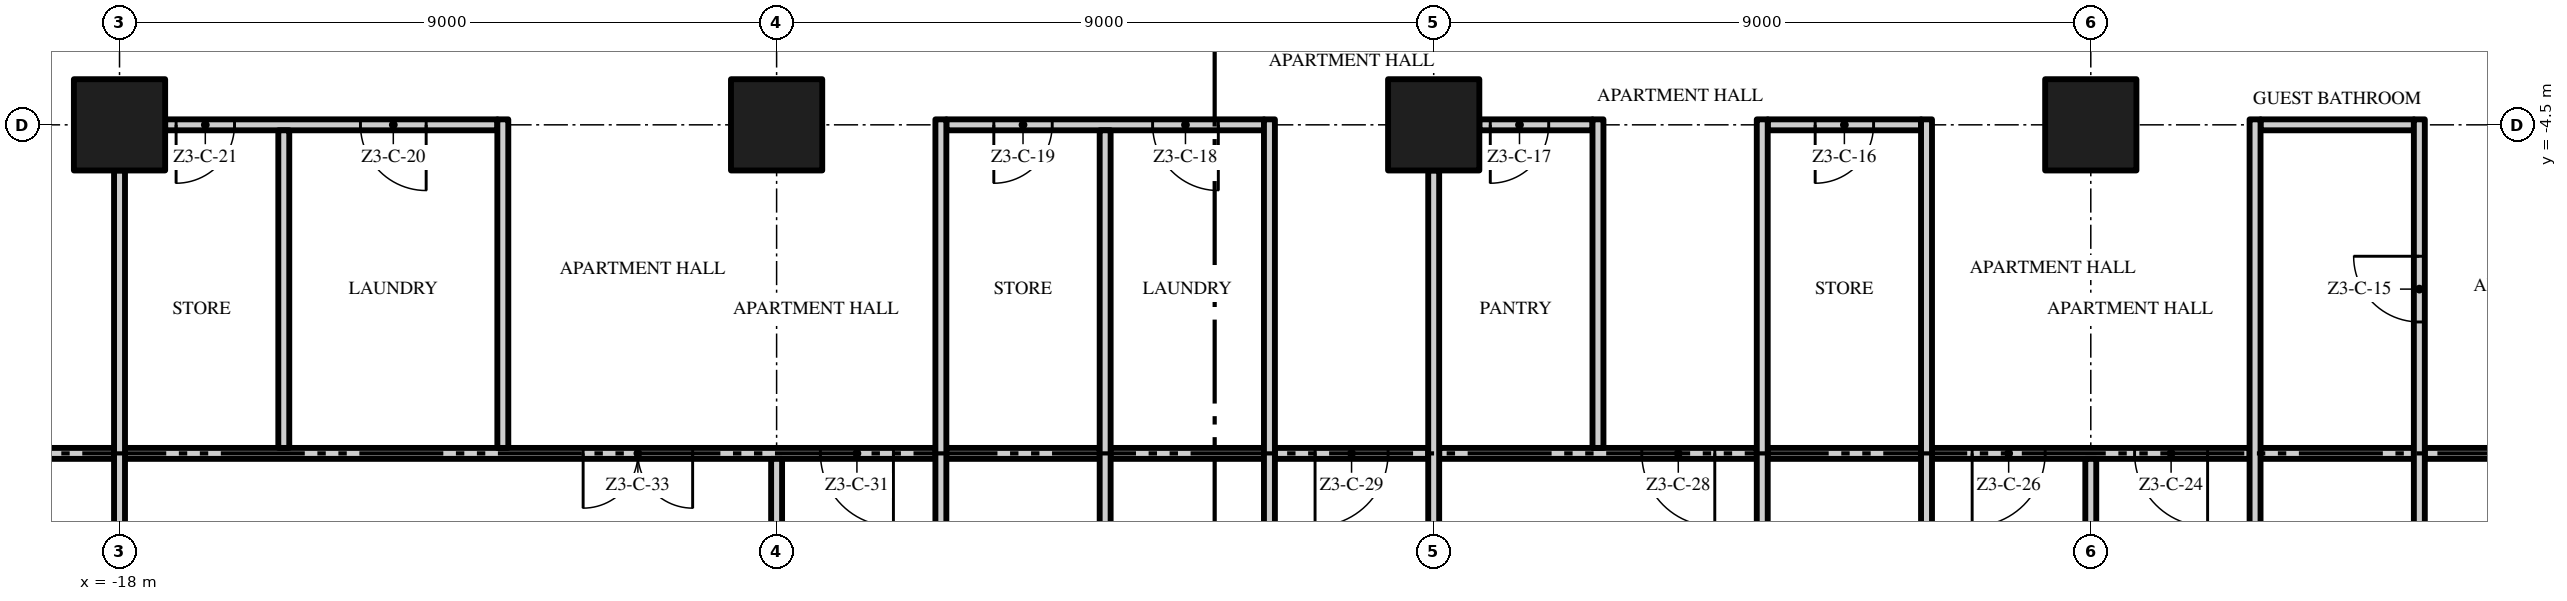
"""IFC4 building model, lengths in metres.
Left out: names, types, materials, properties, quantities, classifications, styles, units other than length and angle.
Written with IfcOpenShell. Run it as: python <this file> out.ifc"""

import sys

from ifc_helpers import new_model, si_unit, direction, frame, frame_2d, origin, origin_2d, place, context, subcontext, project, spatial, rectangle, extrude, element, fill, save


model = new_model("IFC4")
c1 = context("Model", 3, precision=1e-05, world=origin(), true_north=direction((0.0, 1.0)))
c2 = subcontext(c1, "Body", "Model", "MODEL_VIEW")
j1 = project(units=[si_unit("LENGTHUNIT", "METRE"), si_unit("PLANEANGLEUNIT", "RADIAN")], contexts=[c1])
p1 = place(None, origin())
s1 = spatial("IfcSite", under=j1, at=p1, CompositionType="ELEMENT")
p2 = place(p1, origin())
s2 = spatial("IfcBuilding", under=s1, at=p2, CompositionType="ELEMENT")
p3 = place(p2, frame((0.0, 0.0, 147.8)))
s3 = spatial("IfcBuildingStorey", under=s2, at=p3, CompositionType="ELEMENT", Elevation=147.8)
for number, where, z_axis, x_axis in (
    (1, (-18.0, -4.5, 0.0), (0.0, 0.0, 1.0), (1.0, 0.0, 0.0)),
    (2, (-9.0, -4.5, 0.0), (0.0, 0.0, 1.0), (1.0, 0.0, 0.0)),
    (3, (0.0, -4.5, 0.0), (0.0, 0.0, 1.0), (1.0, 0.0, 0.0)),
    (4, (9.0, -4.5, 0.0), (0.0, 0.0, 1.0), (1.0, 0.0, 0.0)),
):
    element("IfcColumn", number, at=place(p3, frame(where, z_axis=z_axis, x_axis=x_axis)), inside=s3, PredefinedType="COLUMN", context=c2, shape_type="SweptSolid", body=[
        extrude(rectangle(XDim=1.25, YDim=1.25, at=origin_2d()), origin(), (0.0, 0.0, 1.0), 3.5),
    ])
p4 = place(p3, frame((-18.075, -9.0, 0.0), z_axis=(0.0, 0.0, 1.0), x_axis=(-1.0, 0.0, 0.0)))
e5 = element("IfcWall", 5, at=p4, inside=s3, PredefinedType="PARTITIONING", context=c2, shape_type="SweptSolid", body=[
    extrude(rectangle(XDim=4.125, YDim=0.15, at=frame_2d((2.062, 0.0))), origin(), (0.0, 0.0, 1.0), 3.5),
])
p5 = place(p4, frame((1.425, 0.0, 0.0)))
e6 = element("IfcOpeningElement", 6, at=p5, cuts=e5, PredefinedType="OPENING", context=c2, shape_type="SweptSolid", body=[
    extrude(rectangle(XDim=1.5, YDim=2.4, at=frame_2d((0.75, 1.2))), frame((0.0, 0.085, 0.0), z_axis=(0.0, -1.0, 0.0), x_axis=(1.0, 0.0, 0.0)), (0.0, 0.0, 1.0), 0.17),
])
p6 = place(p3, frame((-6.825, -9.0, 0.0), z_axis=(0.0, 0.0, 1.0), x_axis=(-1.0, 0.0, 0.0)))
e7 = element("IfcWall", 7, at=p6, inside=s3, PredefinedType="PARTITIONING", context=c2, shape_type="SweptSolid", body=[
    extrude(rectangle(XDim=11.1, YDim=0.15, at=frame_2d((5.55, 0.0))), origin(), (0.0, 0.0, 1.0), 3.5),
])
p7 = place(p6, frame((0.575, 0.0, 0.0)))
e8 = element("IfcOpeningElement", 8, at=p7, cuts=e7, PredefinedType="OPENING", context=c2, shape_type="SweptSolid", body=[
    extrude(rectangle(XDim=1.0, YDim=2.4, at=frame_2d((0.5, 1.2))), frame((0.0, 0.085, 0.0), z_axis=(0.0, -1.0, 0.0), x_axis=(1.0, 0.0, 0.0)), (0.0, 0.0, 1.0), 0.17),
])
p8 = place(p6, frame((3.325, 0.0, 0.0)))
e9 = element("IfcOpeningElement", 9, at=p8, cuts=e7, PredefinedType="OPENING", context=c2, shape_type="SweptSolid", body=[
    extrude(rectangle(XDim=1.5, YDim=2.4, at=frame_2d((0.75, 1.2))), frame((0.0, 0.085, 0.0), z_axis=(0.0, -1.0, 0.0), x_axis=(1.0, 0.0, 0.0)), (0.0, 0.0, 1.0), 0.17),
])
for number, where, z_axis, x_axis in (
    (10, (-6.675, -9.0, 0.0), (0.0, 0.0, 1.0), (1.0, 0.0, 0.0)),
    (11, (-4.425, -9.0, 0.0), (0.0, 0.0, 1.0), (1.0, 0.0, 0.0)),
):
    element("IfcWall", number, at=place(p3, frame(where, z_axis=z_axis, x_axis=x_axis)), inside=s3, PredefinedType="PARTITIONING", context=c2, shape_type="SweptSolid", body=[
        extrude(rectangle(XDim=2.1, YDim=0.15, at=frame_2d((1.05, 0.0))), origin(), (0.0, 0.0, 1.0), 3.5),
    ])
p9 = place(p3, frame((-0.075, -9.0, 0.0), z_axis=(0.0, 0.0, 1.0), x_axis=(-1.0, 0.0, 0.0)))
e12 = element("IfcWall", 12, at=p9, inside=s3, PredefinedType="PARTITIONING", context=c2, shape_type="SweptSolid", body=[
    extrude(rectangle(XDim=2.1, YDim=0.15, at=frame_2d((1.05, 0.0))), origin(), (0.0, 0.0, 1.0), 3.5),
])
p10 = place(p9, frame((0.55, 0.0, 0.0)))
e13 = element("IfcOpeningElement", 13, at=p10, cuts=e12, PredefinedType="OPENING", context=c2, shape_type="SweptSolid", body=[
    extrude(rectangle(XDim=1.0, YDim=2.4, at=frame_2d((0.5, 1.2))), frame((0.0, 0.085, 0.0), z_axis=(0.0, -1.0, 0.0), x_axis=(1.0, 0.0, 0.0)), (0.0, 0.0, 1.0), 0.17),
])
p11 = place(p3, frame((4.425, -9.0, 0.0), z_axis=(0.0, 0.0, 1.0), x_axis=(-1.0, 0.0, 0.0)))
e14 = element("IfcWall", 14, at=p11, inside=s3, PredefinedType="PARTITIONING", context=c2, shape_type="SweptSolid", body=[
    extrude(rectangle(XDim=4.35, YDim=0.15, at=frame_2d((2.175, 0.0))), origin(), (0.0, 0.0, 1.0), 3.5),
])
p12 = place(p11, frame((0.575, 0.0, 0.0)))
e15 = element("IfcOpeningElement", 15, at=p12, cuts=e14, PredefinedType="OPENING", context=c2, shape_type="SweptSolid", body=[
    extrude(rectangle(XDim=1.0, YDim=2.4, at=frame_2d((0.5, 1.2))), frame((0.0, 0.085, 0.0), z_axis=(0.0, -1.0, 0.0), x_axis=(1.0, 0.0, 0.0)), (0.0, 0.0, 1.0), 0.17),
])
p13 = place(p3, frame((4.575, -9.0, 0.0), z_axis=(0.0, 0.0, 1.0), x_axis=(1.0, 0.0, 0.0)))
e16 = element("IfcWall", 16, at=p13, inside=s3, PredefinedType="PARTITIONING", context=c2, shape_type="SweptSolid", body=[
    extrude(rectangle(XDim=2.1, YDim=0.15, at=frame_2d((1.05, 0.0))), origin(), (0.0, 0.0, 1.0), 3.5),
])
p14 = place(p3, frame((11.175, -9.0, 0.0), z_axis=(0.0, 0.0, 1.0), x_axis=(-1.0, 0.0, 0.0)))
e17 = element("IfcWall", 17, at=p14, inside=s3, PredefinedType="PARTITIONING", context=c2, shape_type="SweptSolid", body=[
    extrude(rectangle(XDim=4.35, YDim=0.15, at=frame_2d((2.175, 0.0))), origin(), (0.0, 0.0, 1.0), 3.5),
])
p15 = place(p14, frame((0.575, 0.0, 0.0)))
e18 = element("IfcOpeningElement", 18, at=p15, cuts=e17, PredefinedType="OPENING", context=c2, shape_type="SweptSolid", body=[
    extrude(rectangle(XDim=1.0, YDim=2.4, at=frame_2d((0.5, 1.2))), frame((0.0, 0.085, 0.0), z_axis=(0.0, -1.0, 0.0), x_axis=(1.0, 0.0, 0.0)), (0.0, 0.0, 1.0), 0.17),
])
p16 = place(p14, frame((2.8, 0.0, 0.0)))
e19 = element("IfcOpeningElement", 19, at=p16, cuts=e17, PredefinedType="OPENING", context=c2, shape_type="SweptSolid", body=[
    extrude(rectangle(XDim=1.0, YDim=2.4, at=frame_2d((0.5, 1.2))), frame((0.0, 0.085, 0.0), z_axis=(0.0, -1.0, 0.0), x_axis=(1.0, 0.0, 0.0)), (0.0, 0.0, 1.0), 0.17),
])
p17 = place(p3, frame((11.325, -9.0, 0.0), z_axis=(0.0, 0.0, 1.0), x_axis=(1.0, 0.0, 0.0)))
e20 = element("IfcWall", 20, at=p17, inside=s3, PredefinedType="PARTITIONING", context=c2, shape_type="SweptSolid", body=[
    extrude(rectangle(XDim=2.1, YDim=0.15, at=frame_2d((1.05, 0.0))), origin(), (0.0, 0.0, 1.0), 3.5),
])
p18 = place(p3, frame((22.2, -9.0, 0.0), z_axis=(0.0, 0.0, 1.0), x_axis=(-1.0, 0.0, 0.0)))
e21 = element("IfcWall", 21, at=p18, inside=s3, PredefinedType="PARTITIONING", context=c2, shape_type="SweptSolid", body=[
    extrude(rectangle(XDim=8.625, YDim=0.15, at=frame_2d((4.312, 0.0))), origin(), (0.0, 0.0, 1.0), 3.5),
])
p19 = place(p18, frame((5.925, 0.0, 0.0)))
e22 = element("IfcOpeningElement", 22, at=p19, cuts=e21, PredefinedType="OPENING", context=c2, shape_type="SweptSolid", body=[
    extrude(rectangle(XDim=1.8, YDim=2.4, at=frame_2d((0.9, 1.2))), frame((0.0, 0.085, 0.0), z_axis=(0.0, -1.0, 0.0), x_axis=(1.0, 0.0, 0.0)), (0.0, 0.0, 1.0), 0.17),
])
p20 = place(p3, frame((-12.825, -4.5, 0.0), z_axis=(0.0, 0.0, 1.0), x_axis=(-1.0, 0.0, 0.0)))
e23 = element("IfcWall", 23, at=p20, inside=s3, PredefinedType="PARTITIONING", context=c2, shape_type="SweptSolid", body=[
    extrude(rectangle(XDim=4.55, YDim=0.15, at=frame_2d((2.275, 0.0))), origin(), (0.0, 0.0, 1.0), 3.5),
])
p21 = place(p20, frame((0.975, 0.0, 0.0)))
e24 = element("IfcOpeningElement", 24, at=p21, cuts=e23, PredefinedType="OPENING", context=c2, shape_type="SweptSolid", body=[
    extrude(rectangle(XDim=0.9, YDim=2.1, at=frame_2d((0.45, 1.05))), frame((0.0, 0.085, 0.0), z_axis=(0.0, -1.0, 0.0), x_axis=(1.0, 0.0, 0.0)), (0.0, 0.0, 1.0), 0.17),
])
p22 = place(p20, frame((3.6, 0.0, 0.0)))
e25 = element("IfcOpeningElement", 25, at=p22, cuts=e23, PredefinedType="OPENING", context=c2, shape_type="SweptSolid", body=[
    extrude(rectangle(XDim=0.8, YDim=2.0, at=frame_2d((0.4, 1.0))), frame((0.0, 0.085, 0.0), z_axis=(0.0, -1.0, 0.0), x_axis=(1.0, 0.0, 0.0)), (0.0, 0.0, 1.0), 0.17),
])
p23 = place(p3, frame((-2.325, -4.5, 0.0), z_axis=(0.0, 0.0, 1.0), x_axis=(-1.0, 0.0, 0.0)))
e26 = element("IfcWall", 26, at=p23, inside=s3, PredefinedType="PARTITIONING", context=c2, shape_type="SweptSolid", body=[
    extrude(rectangle(XDim=4.35, YDim=0.15, at=frame_2d((2.175, 0.0))), origin(), (0.0, 0.0, 1.0), 3.5),
])
p24 = place(p23, frame((0.625, 0.0, 0.0)))
e27 = element("IfcOpeningElement", 27, at=p24, cuts=e26, PredefinedType="OPENING", context=c2, shape_type="SweptSolid", body=[
    extrude(rectangle(XDim=0.9, YDim=2.1, at=frame_2d((0.45, 1.05))), frame((0.0, 0.085, 0.0), z_axis=(0.0, -1.0, 0.0), x_axis=(1.0, 0.0, 0.0)), (0.0, 0.0, 1.0), 0.17),
])
p25 = place(p23, frame((2.9, 0.0, 0.0)))
e28 = element("IfcOpeningElement", 28, at=p25, cuts=e26, PredefinedType="OPENING", context=c2, shape_type="SweptSolid", body=[
    extrude(rectangle(XDim=0.8, YDim=2.0, at=frame_2d((0.4, 1.0))), frame((0.0, 0.085, 0.0), z_axis=(0.0, -1.0, 0.0), x_axis=(1.0, 0.0, 0.0)), (0.0, 0.0, 1.0), 0.17),
])
p26 = place(p3, frame((2.175, -4.5, 0.0), z_axis=(0.0, 0.0, 1.0), x_axis=(-1.0, 0.0, 0.0)))
e29 = element("IfcWall", 29, at=p26, inside=s3, PredefinedType="PARTITIONING", context=c2, shape_type="SweptSolid", body=[
    extrude(rectangle(XDim=1.55, YDim=0.15, at=frame_2d((0.775, 0.0))), origin(), (0.0, 0.0, 1.0), 3.5),
])
p27 = place(p26, frame((0.6, 0.0, 0.0)))
e30 = element("IfcOpeningElement", 30, at=p27, cuts=e29, PredefinedType="OPENING", context=c2, shape_type="SweptSolid", body=[
    extrude(rectangle(XDim=0.8, YDim=2.0, at=frame_2d((0.4, 1.0))), frame((0.0, 0.085, 0.0), z_axis=(0.0, -1.0, 0.0), x_axis=(1.0, 0.0, 0.0)), (0.0, 0.0, 1.0), 0.17),
])
p28 = place(p3, frame((6.675, -4.5, 0.0), z_axis=(0.0, 0.0, 1.0), x_axis=(-1.0, 0.0, 0.0)))
e31 = element("IfcWall", 31, at=p28, inside=s3, PredefinedType="PARTITIONING", context=c2, shape_type="SweptSolid", body=[
    extrude(rectangle(XDim=2.1, YDim=0.15, at=frame_2d((1.05, 0.0))), origin(), (0.0, 0.0, 1.0), 3.5),
])
p29 = place(p28, frame((0.65, 0.0, 0.0)))
e32 = element("IfcOpeningElement", 32, at=p29, cuts=e31, PredefinedType="OPENING", context=c2, shape_type="SweptSolid", body=[
    extrude(rectangle(XDim=0.8, YDim=2.0, at=frame_2d((0.4, 1.0))), frame((0.0, 0.085, 0.0), z_axis=(0.0, -1.0, 0.0), x_axis=(1.0, 0.0, 0.0)), (0.0, 0.0, 1.0), 0.17),
])
p30 = place(p3, frame((11.325, -4.5, 0.0), z_axis=(0.0, 0.0, 1.0), x_axis=(1.0, 0.0, 0.0)))
e33 = element("IfcWall", 33, at=p30, inside=s3, PredefinedType="PARTITIONING", context=c2, shape_type="SweptSolid", body=[
    extrude(rectangle(XDim=2.1, YDim=0.15, at=frame_2d((1.05, 0.0))), origin(), (0.0, 0.0, 1.0), 3.5),
])
p31 = place(p3, frame((-18.0, -12.875, 0.0), z_axis=(0.0, 0.0, 1.0), x_axis=(0.0, 1.0, 0.0)))
e34 = element("IfcWall", 34, at=p31, inside=s3, PredefinedType="PARTITIONING", context=c2, shape_type="SweptSolid", body=[
    extrude(rectangle(XDim=7.75, YDim=0.15, at=frame_2d((3.875, 0.0))), origin(), (0.0, 0.0, 1.0), 3.5),
])
p32 = place(p3, frame((-15.75, -8.925, 0.0), z_axis=(0.0, 0.0, 1.0), x_axis=(0.0, 1.0, 0.0)))
e35 = element("IfcWall", 35, at=p32, inside=s3, PredefinedType="PARTITIONING", context=c2, shape_type="SweptSolid", body=[
    extrude(rectangle(XDim=4.35, YDim=0.15, at=frame_2d((2.175, 0.0))), origin(), (0.0, 0.0, 1.0), 3.5),
])
p33 = place(p3, frame((-12.75, -8.925, 0.0), z_axis=(0.0, 0.0, 1.0), x_axis=(0.0, 1.0, 0.0)))
e36 = element("IfcWall", 36, at=p33, inside=s3, PredefinedType="PARTITIONING", context=c2, shape_type="SweptSolid", body=[
    extrude(rectangle(XDim=4.5, YDim=0.15, at=frame_2d((2.25, 0.0))), origin(), (0.0, 0.0, 1.0), 3.5),
])
p34 = place(p3, frame((-9.0, -12.875, 0.0), z_axis=(0.0, 0.0, 1.0), x_axis=(0.0, 1.0, 0.0)))
e37 = element("IfcWall", 37, at=p34, inside=s3, PredefinedType="PARTITIONING", context=c2, shape_type="SweptSolid", body=[
    extrude(rectangle(XDim=3.8, YDim=0.15, at=frame_2d((1.9, 0.0))), origin(), (0.0, 0.0, 1.0), 3.5),
])
p35 = place(p3, frame((-6.75, -12.075, 0.0), z_axis=(0.0, 0.0, 1.0), x_axis=(0.0, 1.0, 0.0)))
e38 = element("IfcWall", 38, at=p35, inside=s3, PredefinedType="PARTITIONING", context=c2, shape_type="SweptSolid", body=[
    extrude(rectangle(XDim=7.65, YDim=0.15, at=frame_2d((3.825, 0.0))), origin(), (0.0, 0.0, 1.0), 3.5),
])
p36 = place(p3, frame((-4.5, -17.7, 0.0), z_axis=(0.0, 0.0, 1.0), x_axis=(0.0, 1.0, 0.0)))
e39 = element("IfcWall", 39, at=p36, inside=s3, PredefinedType="PARTITIONING", context=c2, shape_type="SweptSolid", body=[
    extrude(rectangle(XDim=13.125, YDim=0.15, at=frame_2d((6.562, 0.0))), origin(), (0.0, 0.0, 1.0), 3.5),
])
p37 = place(p3, frame((-2.25, -12.075, 0.0), z_axis=(0.0, 0.0, 1.0), x_axis=(0.0, 1.0, 0.0)))
e40 = element("IfcWall", 40, at=p37, inside=s3, PredefinedType="PARTITIONING", context=c2, shape_type="SweptSolid", body=[
    extrude(rectangle(XDim=7.65, YDim=0.15, at=frame_2d((3.825, 0.0))), origin(), (0.0, 0.0, 1.0), 3.5),
])
p38 = place(p3, frame((0.0, -12.875, 0.0), z_axis=(0.0, 0.0, 1.0), x_axis=(0.0, 1.0, 0.0)))
e41 = element("IfcWall", 41, at=p38, inside=s3, PredefinedType="PARTITIONING", context=c2, shape_type="SweptSolid", body=[
    extrude(rectangle(XDim=7.75, YDim=0.15, at=frame_2d((3.875, 0.0))), origin(), (0.0, 0.0, 1.0), 3.5),
])
p39 = place(p3, frame((2.25, -8.925, 0.0), z_axis=(0.0, 0.0, 1.0), x_axis=(0.0, 1.0, 0.0)))
e42 = element("IfcWall", 42, at=p39, inside=s3, PredefinedType="PARTITIONING", context=c2, shape_type="SweptSolid", body=[
    extrude(rectangle(XDim=4.5, YDim=0.15, at=frame_2d((2.25, 0.0))), origin(), (0.0, 0.0, 1.0), 3.5),
])
p40 = place(p3, frame((4.5, -17.7, 0.0), z_axis=(0.0, 0.0, 1.0), x_axis=(0.0, 1.0, 0.0)))
e43 = element("IfcWall", 43, at=p40, inside=s3, PredefinedType="PARTITIONING", context=c2, shape_type="SweptSolid", body=[
    extrude(rectangle(XDim=13.275, YDim=0.15, at=frame_2d((6.638, 0.0))), origin(), (0.0, 0.0, 1.0), 3.5),
])
p41 = place(p3, frame((6.75, -12.075, 0.0), z_axis=(0.0, 0.0, 1.0), x_axis=(0.0, 1.0, 0.0)))
e44 = element("IfcWall", 44, at=p41, inside=s3, PredefinedType="PARTITIONING", context=c2, shape_type="SweptSolid", body=[
    extrude(rectangle(XDim=7.65, YDim=0.15, at=frame_2d((3.825, 0.0))), origin(), (0.0, 0.0, 1.0), 3.5),
])
p42 = place(p3, frame((9.0, -12.875, 0.0), z_axis=(0.0, 0.0, 1.0), x_axis=(0.0, 1.0, 0.0)))
e45 = element("IfcWall", 45, at=p42, inside=s3, PredefinedType="PARTITIONING", context=c2, shape_type="SweptSolid", body=[
    extrude(rectangle(XDim=3.8, YDim=0.15, at=frame_2d((1.9, 0.0))), origin(), (0.0, 0.0, 1.0), 3.5),
])
p43 = place(p3, frame((11.25, -12.075, 0.0), z_axis=(0.0, 0.0, 1.0), x_axis=(0.0, 1.0, 0.0)))
e46 = element("IfcWall", 46, at=p43, inside=s3, PredefinedType="PARTITIONING", context=c2, shape_type="SweptSolid", body=[
    extrude(rectangle(XDim=7.65, YDim=0.15, at=frame_2d((3.825, 0.0))), origin(), (0.0, 0.0, 1.0), 3.5),
])
p44 = place(p3, frame((13.5, -17.7, 0.0), z_axis=(0.0, 0.0, 1.0), x_axis=(0.0, 1.0, 0.0)))
e47 = element("IfcWall", 47, at=p44, inside=s3, PredefinedType="PARTITIONING", context=c2, shape_type="SweptSolid", body=[
    extrude(rectangle(XDim=13.275, YDim=0.15, at=frame_2d((6.638, 0.0))), origin(), (0.0, 0.0, 1.0), 3.5),
])
p45 = place(p44, frame((10.5, 0.0, 0.0)))
e48 = element("IfcOpeningElement", 48, at=p45, cuts=e47, PredefinedType="OPENING", context=c2, shape_type="SweptSolid", body=[
    extrude(rectangle(XDim=0.9, YDim=2.1, at=frame_2d((0.45, 1.05))), frame((0.0, 0.085, 0.0), z_axis=(0.0, -1.0, 0.0), x_axis=(1.0, 0.0, 0.0)), (0.0, 0.0, 1.0), 0.17),
])
p46 = place(p45, origin())
e49 = element("IfcDoor", 49, at=p46, inside=s3, OperationType="SINGLE_SWING_RIGHT", PredefinedType="DOOR", context=c2, shape_type="SweptSolid", body=[
    extrude(rectangle(XDim=0.9, YDim=2.1, at=frame_2d((0.45, 1.05))), frame((0.0, 0.025, 0.0), z_axis=(0.0, -1.0, 0.0), x_axis=(1.0, 0.0, 0.0)), (0.0, 0.0, 1.0), 0.05),
])
fill(e48, e49)
p47 = place(p29, origin())
e50 = element("IfcDoor", 50, at=p47, inside=s3, OperationType="SINGLE_SWING_RIGHT", PredefinedType="DOOR", context=c2, shape_type="SweptSolid", body=[
    extrude(rectangle(XDim=0.8, YDim=2.0, at=frame_2d((0.4, 1.0))), frame((0.0, 0.025, 0.0), z_axis=(0.0, -1.0, 0.0), x_axis=(1.0, 0.0, 0.0)), (0.0, 0.0, 1.0), 0.05),
])
fill(e32, e50)
p48 = place(p27, origin())
e51 = element("IfcDoor", 51, at=p48, inside=s3, OperationType="SINGLE_SWING_RIGHT", PredefinedType="DOOR", context=c2, shape_type="SweptSolid", body=[
    extrude(rectangle(XDim=0.8, YDim=2.0, at=frame_2d((0.4, 1.0))), frame((0.0, 0.025, 0.0), z_axis=(0.0, -1.0, 0.0), x_axis=(1.0, 0.0, 0.0)), (0.0, 0.0, 1.0), 0.05),
])
fill(e30, e51)
p49 = place(p24, origin())
e52 = element("IfcDoor", 52, at=p49, inside=s3, OperationType="SINGLE_SWING_LEFT", PredefinedType="DOOR", context=c2, shape_type="SweptSolid", body=[
    extrude(rectangle(XDim=0.9, YDim=2.1, at=frame_2d((0.45, 1.05))), frame((0.0, 0.025, 0.0), z_axis=(0.0, -1.0, 0.0), x_axis=(1.0, 0.0, 0.0)), (0.0, 0.0, 1.0), 0.05),
])
fill(e27, e52)
p50 = place(p25, origin())
e53 = element("IfcDoor", 53, at=p50, inside=s3, OperationType="SINGLE_SWING_RIGHT", PredefinedType="DOOR", context=c2, shape_type="SweptSolid", body=[
    extrude(rectangle(XDim=0.8, YDim=2.0, at=frame_2d((0.4, 1.0))), frame((0.0, 0.025, 0.0), z_axis=(0.0, -1.0, 0.0), x_axis=(1.0, 0.0, 0.0)), (0.0, 0.0, 1.0), 0.05),
])
fill(e28, e53)
p51 = place(p21, origin())
e54 = element("IfcDoor", 54, at=p51, inside=s3, OperationType="SINGLE_SWING_LEFT", PredefinedType="DOOR", context=c2, shape_type="SweptSolid", body=[
    extrude(rectangle(XDim=0.9, YDim=2.1, at=frame_2d((0.45, 1.05))), frame((0.0, 0.025, 0.0), z_axis=(0.0, -1.0, 0.0), x_axis=(1.0, 0.0, 0.0)), (0.0, 0.0, 1.0), 0.05),
])
fill(e24, e54)
p52 = place(p22, origin())
e55 = element("IfcDoor", 55, at=p52, inside=s3, OperationType="SINGLE_SWING_RIGHT", PredefinedType="DOOR", context=c2, shape_type="SweptSolid", body=[
    extrude(rectangle(XDim=0.8, YDim=2.0, at=frame_2d((0.4, 1.0))), frame((0.0, 0.025, 0.0), z_axis=(0.0, -1.0, 0.0), x_axis=(1.0, 0.0, 0.0)), (0.0, 0.0, 1.0), 0.05),
])
fill(e25, e55)
p53 = place(p15, origin())
e56 = element("IfcDoor", 56, at=p53, inside=s3, OperationType="SINGLE_SWING_LEFT", PredefinedType="DOOR", context=c2, shape_type="SweptSolid", body=[
    extrude(rectangle(XDim=1.0, YDim=2.4, at=frame_2d((0.5, 1.2))), frame((0.0, 0.025, 0.0), z_axis=(0.0, -1.0, 0.0), x_axis=(1.0, 0.0, 0.0)), (0.0, 0.0, 1.0), 0.05),
])
fill(e18, e56)
p54 = place(p16, origin())
e57 = element("IfcDoor", 57, at=p54, inside=s3, OperationType="SINGLE_SWING_RIGHT", PredefinedType="DOOR", context=c2, shape_type="SweptSolid", body=[
    extrude(rectangle(XDim=1.0, YDim=2.4, at=frame_2d((0.5, 1.2))), frame((0.0, 0.025, 0.0), z_axis=(0.0, -1.0, 0.0), x_axis=(1.0, 0.0, 0.0)), (0.0, 0.0, 1.0), 0.05),
])
fill(e19, e57)
p55 = place(p12, origin())
e58 = element("IfcDoor", 58, at=p55, inside=s3, OperationType="SINGLE_SWING_LEFT", PredefinedType="DOOR", context=c2, shape_type="SweptSolid", body=[
    extrude(rectangle(XDim=1.0, YDim=2.4, at=frame_2d((0.5, 1.2))), frame((0.0, 0.025, 0.0), z_axis=(0.0, -1.0, 0.0), x_axis=(1.0, 0.0, 0.0)), (0.0, 0.0, 1.0), 0.05),
])
fill(e15, e58)
p56 = place(p10, origin())
e59 = element("IfcDoor", 59, at=p56, inside=s3, OperationType="SINGLE_SWING_RIGHT", PredefinedType="DOOR", context=c2, shape_type="SweptSolid", body=[
    extrude(rectangle(XDim=1.0, YDim=2.4, at=frame_2d((0.5, 1.2))), frame((0.0, 0.025, 0.0), z_axis=(0.0, -1.0, 0.0), x_axis=(1.0, 0.0, 0.0)), (0.0, 0.0, 1.0), 0.05),
])
fill(e13, e59)
p57 = place(p7, origin())
e60 = element("IfcDoor", 60, at=p57, inside=s3, OperationType="SINGLE_SWING_LEFT", PredefinedType="DOOR", context=c2, shape_type="SweptSolid", body=[
    extrude(rectangle(XDim=1.0, YDim=2.4, at=frame_2d((0.5, 1.2))), frame((0.0, 0.025, 0.0), z_axis=(0.0, -1.0, 0.0), x_axis=(1.0, 0.0, 0.0)), (0.0, 0.0, 1.0), 0.05),
])
fill(e8, e60)
p58 = place(p8, origin())
e61 = element("IfcDoor", 61, at=p58, inside=s3, OperationType="DOUBLE_DOOR_SINGLE_SWING", PredefinedType="DOOR", context=c2, shape_type="SweptSolid", body=[
    extrude(rectangle(XDim=1.5, YDim=2.4, at=frame_2d((0.75, 1.2))), frame((0.0, 0.025, 0.0), z_axis=(0.0, -1.0, 0.0), x_axis=(1.0, 0.0, 0.0)), (0.0, 0.0, 1.0), 0.05),
])
fill(e9, e61)
save(model, sys.argv[1])
